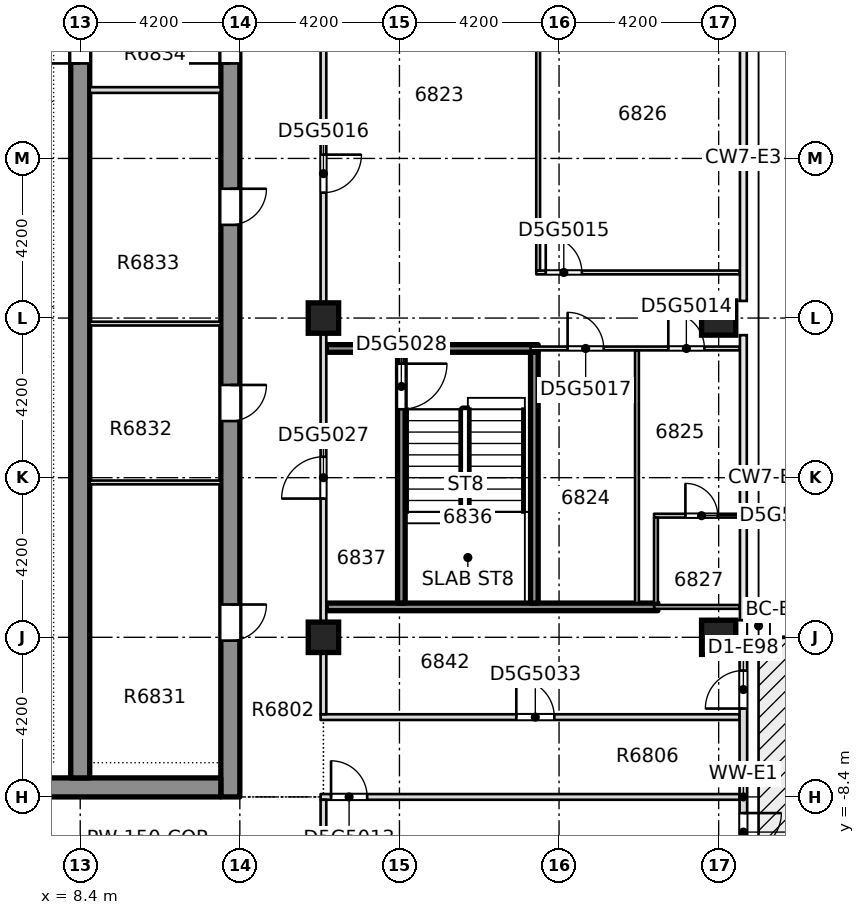
"""IFC4 building model, lengths in metres.
Left out: names, types, materials, properties, quantities, classifications, styles, units other than length and angle.
Written with IfcOpenShell. Run it as: python <this file> out.ifc"""

import sys

from ifc_helpers import new_model, si_unit, direction, frame, frame_2d, origin, origin_2d, place, context, subcontext, project, spatial, rectangle, extrude, element, fill, save


model = new_model("IFC4")
c1 = context("Model", 3, precision=1e-05, world=origin(), true_north=direction((0.0, 1.0)))
c2 = subcontext(c1, "Body", "Model", "MODEL_VIEW")
j1 = project(units=[si_unit("LENGTHUNIT", "METRE"), si_unit("PLANEANGLEUNIT", "RADIAN")], contexts=[c1])
p1 = place(None, origin())
s1 = spatial("IfcSite", under=j1, at=p1, CompositionType="ELEMENT")
p2 = place(p1, origin())
s2 = spatial("IfcBuilding", under=s1, at=p2, CompositionType="ELEMENT")
p3 = place(p2, frame((0.0, 0.0, 257.95)))
s3 = spatial("IfcBuildingStorey", under=s2, at=p3, CompositionType="ELEMENT", Elevation=257.95)
p4 = place(p3, frame((12.35, -8.4, -0.4), z_axis=(0.0, 0.0, 1.0), x_axis=(0.0, 1.0, 0.0)))
e1 = element("IfcWall", 1, at=p4, inside=s3, PredefinedType="SHEAR", context=c2, shape_type="SweptSolid", body=[
    extrude(rectangle(XDim=30.15, YDim=0.5, at=frame_2d((15.075, 0.0))), origin(), (0.0, 0.0, 1.0), 3.45),
])
p5 = place(p4, frame((4.113, 0.0, 0.4)))
e2 = element("IfcOpeningElement", 2, at=p5, cuts=e1, PredefinedType="OPENING", context=c2, shape_type="SweptSolid", body=[
    extrude(rectangle(XDim=0.95, YDim=2.1, at=frame_2d((0.475, 1.05))), frame((0.0, 0.26, 0.0), z_axis=(0.0, -1.0, 0.0), x_axis=(1.0, 0.0, 0.0)), (0.0, 0.0, 1.0), 0.52),
])
p6 = place(p4, frame((9.89, 0.0, 0.4)))
e3 = element("IfcOpeningElement", 3, at=p6, cuts=e1, PredefinedType="OPENING", context=c2, shape_type="SweptSolid", body=[
    extrude(rectangle(XDim=0.95, YDim=2.1, at=frame_2d((0.475, 1.05))), frame((0.0, 0.26, 0.0), z_axis=(0.0, -1.0, 0.0), x_axis=(1.0, 0.0, 0.0)), (0.0, 0.0, 1.0), 0.52),
])
p7 = place(p4, frame((15.052, 0.0, 0.4)))
e4 = element("IfcOpeningElement", 4, at=p7, cuts=e1, PredefinedType="OPENING", context=c2, shape_type="SweptSolid", body=[
    extrude(rectangle(XDim=0.95, YDim=2.1, at=frame_2d((0.475, 1.05))), frame((0.0, 0.26, 0.0), z_axis=(0.0, -1.0, 0.0), x_axis=(1.0, 0.0, 0.0)), (0.0, 0.0, 1.0), 0.52),
])
p8 = place(p4, frame((22.144, 0.0, 0.4)))
e5 = element("IfcOpeningElement", 5, at=p8, cuts=e1, PredefinedType="OPENING", context=c2, shape_type="SweptSolid", body=[
    extrude(rectangle(XDim=0.95, YDim=2.1, at=frame_2d((0.475, 1.05))), frame((0.0, 0.26, 0.0), z_axis=(0.0, -1.0, 0.0), x_axis=(1.0, 0.0, 0.0)), (0.0, 0.0, 1.0), 0.52),
])
p9 = place(p4, frame((24.998, 0.0, 0.4)))
e6 = element("IfcOpeningElement", 6, at=p9, cuts=e1, PredefinedType="OPENING", context=c2, shape_type="SweptSolid", body=[
    extrude(rectangle(XDim=0.95, YDim=2.1, at=frame_2d((0.475, 1.05))), frame((0.0, 0.26, 0.0), z_axis=(0.0, -1.0, 0.0), x_axis=(1.0, 0.0, 0.0)), (0.0, 0.0, 1.0), 0.52),
])
p10 = place(p4, frame((27.605, 0.0, 0.4)))
e7 = element("IfcOpeningElement", 7, at=p10, cuts=e1, PredefinedType="OPENING", context=c2, shape_type="SweptSolid", body=[
    extrude(rectangle(XDim=0.95, YDim=2.1, at=frame_2d((0.475, 1.05))), frame((0.0, 0.26, 0.0), z_axis=(0.0, -1.0, 0.0), x_axis=(1.0, 0.0, 0.0)), (0.0, 0.0, 1.0), 0.52),
])
p11 = place(p4, frame((19.3, 0.0, 0.4)))
e8 = element("IfcOpeningElement", 8, at=p11, cuts=e1, PredefinedType="OPENING", context=c2, shape_type="SweptSolid", body=[
    extrude(rectangle(XDim=1.2, YDim=2.1, at=frame_2d((0.6, 1.05))), frame((0.0, 0.26, 0.0), z_axis=(0.0, -1.0, 0.0), x_axis=(1.0, 0.0, 0.0)), (0.0, 0.0, 1.0), 0.52),
])
p12 = place(p3, frame((-12.1, -8.15, -0.4), z_axis=(0.0, 0.0, 1.0), x_axis=(1.0, 0.0, 0.0)))
e9 = element("IfcWall", 9, at=p12, inside=s3, PredefinedType="SHEAR", context=c2, shape_type="SweptSolid", body=[
    extrude(rectangle(XDim=24.2, YDim=0.5, at=frame_2d((12.1, 0.0))), origin(), (0.0, 0.0, 1.0), 3.45),
])
p13 = place(p12, frame((7.35, 0.0, 0.4)))
e10 = element("IfcOpeningElement", 10, at=p13, cuts=e9, PredefinedType="OPENING", context=c2, shape_type="SweptSolid", body=[
    extrude(rectangle(XDim=1.8, YDim=2.1, at=frame_2d((0.9, 1.05))), frame((0.0, 0.26, 0.0), z_axis=(0.0, -1.0, 0.0), x_axis=(1.0, 0.0, 0.0)), (0.0, 0.0, 1.0), 0.52),
])
p14 = place(p12, frame((15.05, 0.0, 0.4)))
e11 = element("IfcOpeningElement", 11, at=p14, cuts=e9, PredefinedType="OPENING", context=c2, shape_type="SweptSolid", body=[
    extrude(rectangle(XDim=1.8, YDim=2.1, at=frame_2d((0.9, 1.05))), frame((0.0, 0.26, 0.0), z_axis=(0.0, -1.0, 0.0), x_axis=(1.0, 0.0, 0.0)), (0.0, 0.0, 1.0), 0.52),
])
p15 = place(p3, frame((8.4, -7.9, -0.4), z_axis=(0.0, 0.0, 1.0), x_axis=(0.0, 1.0, 0.0)))
e12 = element("IfcWall", 12, at=p15, inside=s3, PredefinedType="SHEAR", context=c2, shape_type="SweptSolid", body=[
    extrude(rectangle(XDim=29.15, YDim=0.5, at=frame_2d((14.575, 0.0))), origin(), (0.0, 0.0, 1.0), 3.45),
])
p16 = place(p15, frame((18.8, 0.0, 0.4)))
e13 = element("IfcOpeningElement", 13, at=p16, cuts=e12, PredefinedType="OPENING", context=c2, shape_type="SweptSolid", body=[
    extrude(rectangle(XDim=1.2, YDim=2.1, at=frame_2d((0.6, 1.05))), frame((0.0, 0.26, 0.0), z_axis=(0.0, -1.0, 0.0), x_axis=(1.0, 0.0, 0.0)), (0.0, 0.0, 1.0), 0.52),
])
for number, where, z_axis, x_axis in (
    (14, (25.2, -4.2, -0.4), (0.0, 0.0, 1.0), (1.0, 0.0, 0.0)),
    (15, (25.2, 4.2, -0.4), (0.0, 0.0, 1.0), (1.0, 0.0, 0.0)),
):
    element("IfcColumn", number, at=place(p3, frame(where, z_axis=z_axis, x_axis=x_axis)), inside=s3, PredefinedType="COLUMN", context=c2, shape_type="SweptSolid", body=[
        extrude(rectangle(XDim=0.9, YDim=0.9, at=origin_2d()), origin(), (0.0, 0.0, 1.0), 3.45),
    ])
for number, where, z_axis, x_axis in (
    (16, (14.8, -4.2, -0.4), (0.0, 0.0, 1.0), (1.0, 0.0, 0.0)),
    (17, (14.8, 4.2, -0.4), (0.0, 0.0, 1.0), (1.0, 0.0, 0.0)),
):
    element("IfcColumn", number, at=place(p3, frame(where, z_axis=z_axis, x_axis=x_axis)), inside=s3, PredefinedType="COLUMN", context=c2, shape_type="SweptSolid", body=[
        extrude(rectangle(XDim=0.8, YDim=0.8, at=origin_2d()), origin(), (0.0, 0.0, 1.0), 3.45),
    ])
p17 = place(p3, frame((14.725, -8.4, 0.0), z_axis=(0.0, 0.0, 1.0), x_axis=(1.0, 0.0, 0.0)))
e18 = element("IfcWall", 18, at=p17, inside=s3, PredefinedType="PARTITIONING", context=c2, shape_type="SweptSolid", body=[
    extrude(rectangle(XDim=11.025, YDim=0.15, at=frame_2d((5.512, 0.0))), origin(), (0.0, 0.0, 1.0), 3.05),
])
p18 = place(p17, frame((0.275, 0.0, 0.0)))
e19 = element("IfcOpeningElement", 19, at=p18, cuts=e18, PredefinedType="OPENING", context=c2, shape_type="SweptSolid", body=[
    extrude(rectangle(XDim=0.95, YDim=2.1, at=frame_2d((0.475, 1.05))), frame((0.0, 0.085, 0.0), z_axis=(0.0, -1.0, 0.0), x_axis=(1.0, 0.0, 0.0)), (0.0, 0.0, 1.0), 0.17),
])
p19 = place(p3, frame((14.725, -6.3, 0.0), z_axis=(0.0, 0.0, 1.0), x_axis=(1.0, 0.0, 0.0)))
e20 = element("IfcWall", 20, at=p19, inside=s3, PredefinedType="PARTITIONING", context=c2, shape_type="SweptSolid", body=[
    extrude(rectangle(XDim=11.025, YDim=0.15, at=frame_2d((5.512, 0.0))), origin(), (0.0, 0.0, 1.0), 3.05),
])
p20 = place(p19, frame((5.15, 0.0, 0.0)))
e21 = element("IfcOpeningElement", 21, at=p20, cuts=e20, PredefinedType="OPENING", context=c2, shape_type="SweptSolid", body=[
    extrude(rectangle(XDim=1.0, YDim=2.1, at=frame_2d((0.5, 1.05))), frame((0.0, 0.085, 0.0), z_axis=(0.0, -1.0, 0.0), x_axis=(1.0, 0.0, 0.0)), (0.0, 0.0, 1.0), 0.17),
])
p21 = place(p3, frame((14.875, -3.4, 0.0), z_axis=(0.0, 0.0, 1.0), x_axis=(1.0, 0.0, 0.0)))
e22 = element("IfcWall", 22, at=p21, inside=s3, PredefinedType="SOLIDWALL", context=c2, shape_type="SweptSolid", body=[
    extrude(rectangle(XDim=8.725, YDim=0.2, at=frame_2d((4.363, 0.0))), origin(), (0.0, 0.0, 1.0), 3.05),
])
p22 = place(p3, frame((23.5, -3.4, 0.0), z_axis=(0.0, 0.0, 1.0), x_axis=(1.0, 0.0, 0.0)))
e23 = element("IfcWall", 23, at=p22, inside=s3, PredefinedType="PARTITIONING", context=c2, shape_type="SweptSolid", body=[
    extrude(rectangle(XDim=2.25, YDim=0.1, at=frame_2d((1.125, 0.0))), origin(), (0.0, 0.0, 1.0), 3.05),
])
p23 = place(p3, frame((23.5, -1.0, 0.0), z_axis=(0.0, 0.0, 1.0), x_axis=(1.0, 0.0, 0.0)))
e24 = element("IfcWall", 24, at=p23, inside=s3, PredefinedType="PARTITIONING", context=c2, shape_type="SweptSolid", body=[
    extrude(rectangle(XDim=2.25, YDim=0.1, at=frame_2d((1.125, 0.0))), origin(), (0.0, 0.0, 1.0), 3.05),
])
p24 = place(p23, frame((0.825, 0.0, 0.0)))
e25 = element("IfcOpeningElement", 25, at=p24, cuts=e24, PredefinedType="OPENING", context=c2, shape_type="SweptSolid", body=[
    extrude(rectangle(XDim=0.85, YDim=2.1, at=frame_2d((0.425, 1.05))), frame((0.0, 0.06, 0.0), z_axis=(0.0, -1.0, 0.0), x_axis=(1.0, 0.0, 0.0)), (0.0, 0.0, 1.0), 0.12),
])
p25 = place(p3, frame((14.875, 3.4, 0.0), z_axis=(0.0, 0.0, 1.0), x_axis=(1.0, 0.0, 0.0)))
e26 = element("IfcWall", 26, at=p25, inside=s3, PredefinedType="SOLIDWALL", context=c2, shape_type="SweptSolid", body=[
    extrude(rectangle(XDim=5.575, YDim=0.2, at=frame_2d((2.788, 0.0))), origin(), (0.0, 0.0, 1.0), 3.05),
])
p26 = place(p3, frame((20.25, 3.4, 0.0), z_axis=(0.0, 0.0, 1.0), x_axis=(1.0, 0.0, 0.0)))
e27 = element("IfcWall", 27, at=p26, inside=s3, PredefinedType="PARTITIONING", context=c2, shape_type="SweptSolid", body=[
    extrude(rectangle(XDim=5.5, YDim=0.1, at=frame_2d((2.75, 0.0))), origin(), (0.0, 0.0, 1.0), 3.05),
])
p27 = place(p26, frame((3.625, 0.0, 0.0)))
e28 = element("IfcOpeningElement", 28, at=p27, cuts=e27, PredefinedType="OPENING", context=c2, shape_type="SweptSolid", body=[
    extrude(rectangle(XDim=0.95, YDim=2.1, at=frame_2d((0.475, 1.05))), frame((0.0, 0.06, 0.0), z_axis=(0.0, -1.0, 0.0), x_axis=(1.0, 0.0, 0.0)), (0.0, 0.0, 1.0), 0.12),
])
p28 = place(p26, frame((0.975, 0.0, 0.0)))
e29 = element("IfcOpeningElement", 29, at=p28, cuts=e27, PredefinedType="OPENING", context=c2, shape_type="SweptSolid", body=[
    extrude(rectangle(XDim=0.95, YDim=2.1, at=frame_2d((0.475, 1.05))), frame((0.0, 0.06, 0.0), z_axis=(0.0, -1.0, 0.0), x_axis=(1.0, 0.0, 0.0)), (0.0, 0.0, 1.0), 0.12),
])
p29 = place(p3, frame((20.4, 5.4, 0.0), z_axis=(0.0, 0.0, 1.0), x_axis=(1.0, 0.0, 0.0)))
e30 = element("IfcWall", 30, at=p29, inside=s3, PredefinedType="PARTITIONING", context=c2, shape_type="SweptSolid", body=[
    extrude(rectangle(XDim=5.35, YDim=0.1, at=frame_2d((2.675, 0.0))), origin(), (0.0, 0.0, 1.0), 3.05),
])
p30 = place(p29, frame((0.25, 0.0, 0.0)))
e31 = element("IfcOpeningElement", 31, at=p30, cuts=e30, PredefinedType="OPENING", context=c2, shape_type="SweptSolid", body=[
    extrude(rectangle(XDim=0.95, YDim=2.1, at=frame_2d((0.475, 1.05))), frame((0.0, 0.06, 0.0), z_axis=(0.0, -1.0, 0.0), x_axis=(1.0, 0.0, 0.0)), (0.0, 0.0, 1.0), 0.12),
])
p31 = place(p3, frame((14.8, -10.525, 0.0), z_axis=(0.0, 0.0, 1.0), x_axis=(0.0, 1.0, 0.0)))
e32 = element("IfcWall", 32, at=p31, inside=s3, PredefinedType="PARTITIONING", context=c2, shape_type="SweptSolid", body=[
    extrude(rectangle(XDim=2.05, YDim=0.15, at=frame_2d((1.025, 0.0))), origin(), (0.0, 0.0, 1.0), 3.05),
])
p32 = place(p3, frame((14.8, -6.225, 0.0), z_axis=(0.0, 0.0, 1.0), x_axis=(0.0, 1.0, 0.0)))
e33 = element("IfcWall", 33, at=p32, inside=s3, PredefinedType="PARTITIONING", context=c2, shape_type="SweptSolid", body=[
    extrude(rectangle(XDim=18.75, YDim=0.15, at=frame_2d((9.375, 0.0))), origin(), (0.0, 0.0, 1.0), 3.05),
])
p33 = place(p32, frame((13.725, 0.0, 0.0)))
e34 = element("IfcOpeningElement", 34, at=p33, cuts=e33, PredefinedType="OPENING", context=c2, shape_type="SweptSolid", body=[
    extrude(rectangle(XDim=1.0, YDim=2.1, at=frame_2d((0.5, 1.05))), frame((0.0, 0.085, 0.0), z_axis=(0.0, -1.0, 0.0), x_axis=(1.0, 0.0, 0.0)), (0.0, 0.0, 1.0), 0.17),
])
p34 = place(p32, frame((5.675, 0.0, 0.0)))
e35 = element("IfcOpeningElement", 35, at=p34, cuts=e33, PredefinedType="OPENING", context=c2, shape_type="SweptSolid", body=[
    extrude(rectangle(XDim=1.1, YDim=2.1, at=frame_2d((0.55, 1.05))), frame((0.0, 0.085, 0.0), z_axis=(0.0, -1.0, 0.0), x_axis=(1.0, 0.0, 0.0)), (0.0, 0.0, 1.0), 0.17),
])
p35 = place(p3, frame((16.85, -3.3, 0.0), z_axis=(0.0, 0.0, 1.0), x_axis=(0.0, 1.0, 0.0)))
e36 = element("IfcWall", 36, at=p35, inside=s3, PredefinedType="SOLIDWALL", context=c2, shape_type="SweptSolid", body=[
    extrude(rectangle(XDim=6.6, YDim=0.2, at=frame_2d((3.3, 0.0))), origin(), (0.0, 0.0, 1.0), 3.05),
])
p36 = place(p35, frame((5.1, 0.0, 0.0)))
e37 = element("IfcOpeningElement", 37, at=p36, cuts=e36, PredefinedType="OPENING", context=c2, shape_type="SweptSolid", body=[
    extrude(rectangle(XDim=1.2, YDim=2.1, at=frame_2d((0.6, 1.05))), frame((0.0, 0.11, 0.0), z_axis=(0.0, -1.0, 0.0), x_axis=(1.0, 0.0, 0.0)), (0.0, 0.0, 1.0), 0.22),
])
p37 = place(p3, frame((20.35, -3.3, 0.0), z_axis=(0.0, 0.0, 1.0), x_axis=(0.0, 1.0, 0.0)))
e38 = element("IfcWall", 38, at=p37, inside=s3, PredefinedType="SOLIDWALL", context=c2, shape_type="SweptSolid", body=[
    extrude(rectangle(XDim=6.6, YDim=0.2, at=frame_2d((3.3, 0.0))), origin(), (0.0, 0.0, 1.0), 3.05),
])
p38 = place(p3, frame((20.45, 5.45, 0.0), z_axis=(0.0, 0.0, 1.0), x_axis=(0.0, 1.0, 0.0)))
e39 = element("IfcWall", 39, at=p38, inside=s3, PredefinedType="PARTITIONING", context=c2, shape_type="SweptSolid", body=[
    extrude(rectangle(XDim=7.075, YDim=0.1, at=frame_2d((3.538, 0.0))), origin(), (0.0, 0.0, 1.0), 3.05),
])
p39 = place(p3, frame((23.05, -3.3, 0.0), z_axis=(0.0, 0.0, 1.0), x_axis=(0.0, 1.0, 0.0)))
e40 = element("IfcWall", 40, at=p39, inside=s3, PredefinedType="PARTITIONING", context=c2, shape_type="SweptSolid", body=[
    extrude(rectangle(XDim=6.65, YDim=0.1, at=frame_2d((3.325, 0.0))), origin(), (0.0, 0.0, 1.0), 3.05),
])
p40 = place(p3, frame((23.55, -3.3, 0.0), z_axis=(0.0, 0.0, 1.0), x_axis=(0.0, 1.0, 0.0)))
e41 = element("IfcWall", 41, at=p40, inside=s3, PredefinedType="PARTITIONING", context=c2, shape_type="SweptSolid", body=[
    extrude(rectangle(XDim=2.25, YDim=0.1, at=frame_2d((1.125, 0.0))), origin(), (0.0, 0.0, 1.0), 3.05),
])
p41 = place(p3, frame((25.85, -12.15, 0.0), z_axis=(0.0, 0.0, 1.0), x_axis=(0.0, 1.0, 0.0)))
e42 = element("IfcWall", 42, at=p41, inside=s3, PredefinedType="STANDARD", context=c2, shape_type="SweptSolid", body=[
    extrude(rectangle(XDim=7.5, YDim=0.2, at=frame_2d((3.75, 0.0))), origin(), (0.0, 0.0, 1.0), 3.05),
])
p42 = place(p41, frame((0.425, 0.0, 0.2)))
e43 = element("IfcOpeningElement", 43, at=p42, cuts=e42, PredefinedType="OPENING", context=c2, shape_type="SweptSolid", body=[
    extrude(rectangle(XDim=1.8, YDim=2.65, at=frame_2d((0.9, 1.325))), frame((0.0, 0.11, 0.0), z_axis=(0.0, -1.0, 0.0), x_axis=(1.0, 0.0, 0.0)), (0.0, 0.0, 1.0), 0.22),
])
p43 = place(p41, frame((2.325, 0.0, 0.0)))
e44 = element("IfcOpeningElement", 44, at=p43, cuts=e42, PredefinedType="OPENING", context=c2, shape_type="SweptSolid", body=[
    extrude(rectangle(XDim=1.0, YDim=2.4, at=frame_2d((0.5, 1.2))), frame((0.0, 0.11, 0.0), z_axis=(0.0, -1.0, 0.0), x_axis=(1.0, 0.0, 0.0)), (0.0, 0.0, 1.0), 0.22),
])
p44 = place(p41, frame((6.075, 0.0, 0.0)))
e45 = element("IfcOpeningElement", 45, at=p44, cuts=e42, PredefinedType="OPENING", context=c2, shape_type="SweptSolid", body=[
    extrude(rectangle(XDim=1.0, YDim=2.4, at=frame_2d((0.5, 1.2))), frame((0.0, 0.11, 0.0), z_axis=(0.0, -1.0, 0.0), x_axis=(1.0, 0.0, 0.0)), (0.0, 0.0, 1.0), 0.22),
])
for number, where, z_axis, x_axis in (
    (46, (8.651, -0.125, 0.0), (0.0, 0.0, 1.0), (1.0, 0.0, 0.0)),
    (47, (8.651, 4.054, 0.0), (0.0, 0.0, 1.0), (1.0, 0.0, 0.0)),
):
    element("IfcWall", number, at=place(p3, frame(where, z_axis=z_axis, x_axis=x_axis)), inside=s3, PredefinedType="PARTITIONING", context=c2, shape_type="SweptSolid", body=[
        extrude(rectangle(XDim=3.448, YDim=0.1, at=frame_2d((1.724, 0.0))), origin(), (0.0, 0.0, 1.0), 3.05),
    ])
p45 = place(p3, frame((8.651, 10.2, 0.0), z_axis=(0.0, 0.0, 1.0), x_axis=(1.0, 0.0, 0.0)))
e48 = element("IfcWall", 48, at=p45, inside=s3, PredefinedType="PARTITIONING", context=c2, shape_type="SweptSolid", body=[
    extrude(rectangle(XDim=3.448, YDim=0.15, at=frame_2d((1.724, 0.0))), origin(), (0.0, 0.0, 1.0), 3.05),
])
p46 = place(p18, origin())
e49 = element("IfcDoor", 49, at=p46, inside=s3, OperationType="SINGLE_SWING_RIGHT", PredefinedType="DOOR", context=c2, shape_type="SweptSolid", body=[
    extrude(rectangle(XDim=0.95, YDim=2.1, at=frame_2d((0.475, 1.05))), frame((0.0, 0.025, 0.0), z_axis=(0.0, -1.0, 0.0), x_axis=(1.0, 0.0, 0.0)), (0.0, 0.0, 1.0), 0.05),
])
fill(e19, e49)
p47 = place(p27, origin())
e50 = element("IfcDoor", 50, at=p47, inside=s3, OperationType="SINGLE_SWING_LEFT", PredefinedType="DOOR", context=c2, shape_type="SweptSolid", body=[
    extrude(rectangle(XDim=0.95, YDim=2.1, at=frame_2d((0.475, 1.05))), frame((0.0, 0.025, 0.0), z_axis=(0.0, -1.0, 0.0), x_axis=(1.0, 0.0, 0.0)), (0.0, 0.0, 1.0), 0.05),
])
fill(e28, e50)
p48 = place(p30, origin())
e51 = element("IfcDoor", 51, at=p48, inside=s3, OperationType="SINGLE_SWING_LEFT", PredefinedType="DOOR", context=c2, shape_type="SweptSolid", body=[
    extrude(rectangle(XDim=0.95, YDim=2.1, at=frame_2d((0.475, 1.05))), frame((0.0, 0.025, 0.0), z_axis=(0.0, -1.0, 0.0), x_axis=(1.0, 0.0, 0.0)), (0.0, 0.0, 1.0), 0.05),
])
fill(e31, e51)
p49 = place(p33, origin())
e52 = element("IfcDoor", 52, at=p49, inside=s3, OperationType="SINGLE_SWING_RIGHT", PredefinedType="DOOR", context=c2, shape_type="SweptSolid", body=[
    extrude(rectangle(XDim=1.0, YDim=2.1, at=frame_2d((0.5, 1.05))), frame((0.0, 0.025, 0.0), z_axis=(0.0, -1.0, 0.0), x_axis=(1.0, 0.0, 0.0)), (0.0, 0.0, 1.0), 0.05),
])
fill(e34, e52)
p50 = place(p28, origin())
e53 = element("IfcDoor", 53, at=p50, inside=s3, OperationType="SINGLE_SWING_RIGHT", PredefinedType="DOOR", context=c2, shape_type="SweptSolid", body=[
    extrude(rectangle(XDim=0.95, YDim=2.1, at=frame_2d((0.475, 1.05))), frame((0.0, 0.025, 0.0), z_axis=(0.0, -1.0, 0.0), x_axis=(1.0, 0.0, 0.0)), (0.0, 0.0, 1.0), 0.05),
])
fill(e29, e53)
p51 = place(p24, origin())
e54 = element("IfcDoor", 54, at=p51, inside=s3, OperationType="SINGLE_SWING_RIGHT", PredefinedType="DOOR", context=c2, shape_type="SweptSolid", body=[
    extrude(rectangle(XDim=0.85, YDim=2.1, at=frame_2d((0.425, 1.05))), frame((0.0, 0.025, 0.0), z_axis=(0.0, -1.0, 0.0), x_axis=(1.0, 0.0, 0.0)), (0.0, 0.0, 1.0), 0.05),
])
fill(e25, e54)
p52 = place(p34, origin())
e55 = element("IfcDoor", 55, at=p52, inside=s3, OperationType="SINGLE_SWING_LEFT", PredefinedType="DOOR", context=c2, shape_type="SweptSolid", body=[
    extrude(rectangle(XDim=1.1, YDim=2.1, at=frame_2d((0.55, 1.05))), frame((0.0, 0.025, 0.0), z_axis=(0.0, -1.0, 0.0), x_axis=(1.0, 0.0, 0.0)), (0.0, 0.0, 1.0), 0.05),
])
fill(e35, e55)
p53 = place(p36, origin())
e56 = element("IfcDoor", 56, at=p53, inside=s3, OperationType="SINGLE_SWING_LEFT", PredefinedType="DOOR", context=c2, shape_type="SweptSolid", body=[
    extrude(rectangle(XDim=1.2, YDim=2.1, at=frame_2d((0.6, 1.05))), frame((0.0, 0.025, 0.0), z_axis=(0.0, -1.0, 0.0), x_axis=(1.0, 0.0, 0.0)), (0.0, 0.0, 1.0), 0.05),
])
fill(e37, e56)
p54 = place(p20, origin())
e57 = element("IfcDoor", 57, at=p54, inside=s3, OperationType="SINGLE_SWING_RIGHT", PredefinedType="DOOR", context=c2, shape_type="SweptSolid", body=[
    extrude(rectangle(XDim=1.0, YDim=2.1, at=frame_2d((0.5, 1.05))), frame((0.0, 0.025, 0.0), z_axis=(0.0, -1.0, 0.0), x_axis=(1.0, 0.0, 0.0)), (0.0, 0.0, 1.0), 0.05),
])
fill(e21, e57)
p55 = place(p43, origin())
e58 = element("IfcDoor", 58, at=p55, inside=s3, OperationType="SINGLE_SWING_LEFT", PredefinedType="DOOR", context=c2, shape_type="SweptSolid", body=[
    extrude(rectangle(XDim=1.0, YDim=2.4, at=frame_2d((0.5, 1.2))), frame((0.0, 0.025, 0.0), z_axis=(0.0, -1.0, 0.0), x_axis=(1.0, 0.0, 0.0)), (0.0, 0.0, 1.0), 0.05),
])
fill(e44, e58)
p56 = place(p44, origin())
e59 = element("IfcDoor", 59, at=p56, inside=s3, OperationType="SINGLE_SWING_LEFT", PredefinedType="DOOR", context=c2, shape_type="SweptSolid", body=[
    extrude(rectangle(XDim=1.0, YDim=2.4, at=frame_2d((0.5, 1.2))), frame((0.0, 0.025, 0.0), z_axis=(0.0, -1.0, 0.0), x_axis=(1.0, 0.0, 0.0)), (0.0, 0.0, 1.0), 0.05),
])
fill(e45, e59)
p57 = place(p5, origin())
e60 = element("IfcDoor", 60, at=p57, inside=s3, OperationType="SINGLE_SWING_LEFT", PredefinedType="DOOR", context=c2, shape_type="SweptSolid", body=[
    extrude(rectangle(XDim=0.95, YDim=2.1, at=frame_2d((0.475, 1.05))), frame((0.0, 0.025, 0.0), z_axis=(0.0, -1.0, 0.0), x_axis=(1.0, 0.0, 0.0)), (0.0, 0.0, 1.0), 0.05),
])
fill(e2, e60)
p58 = place(p6, origin())
e61 = element("IfcDoor", 61, at=p58, inside=s3, OperationType="SINGLE_SWING_LEFT", PredefinedType="DOOR", context=c2, shape_type="SweptSolid", body=[
    extrude(rectangle(XDim=0.95, YDim=2.1, at=frame_2d((0.475, 1.05))), frame((0.0, 0.025, 0.0), z_axis=(0.0, -1.0, 0.0), x_axis=(1.0, 0.0, 0.0)), (0.0, 0.0, 1.0), 0.05),
])
fill(e3, e61)
p59 = place(p7, origin())
e62 = element("IfcDoor", 62, at=p59, inside=s3, OperationType="SINGLE_SWING_LEFT", PredefinedType="DOOR", context=c2, shape_type="SweptSolid", body=[
    extrude(rectangle(XDim=0.95, YDim=2.1, at=frame_2d((0.475, 1.05))), frame((0.0, 0.025, 0.0), z_axis=(0.0, -1.0, 0.0), x_axis=(1.0, 0.0, 0.0)), (0.0, 0.0, 1.0), 0.05),
])
fill(e4, e62)
p60 = place(p11, origin())
e63 = element("IfcDoor", 63, at=p60, inside=s3, OperationType="SINGLE_SWING_LEFT", PredefinedType="DOOR", context=c2, shape_type="SweptSolid", body=[
    extrude(rectangle(XDim=1.2, YDim=2.1, at=frame_2d((0.6, 1.05))), frame((0.0, 0.025, 0.0), z_axis=(0.0, -1.0, 0.0), x_axis=(1.0, 0.0, 0.0)), (0.0, 0.0, 1.0), 0.05),
])
fill(e8, e63)
p61 = place(p16, origin())
e64 = element("IfcDoor", 64, at=p61, inside=s3, OperationType="SINGLE_SWING_LEFT", PredefinedType="DOOR", context=c2, shape_type="SweptSolid", body=[
    extrude(rectangle(XDim=1.2, YDim=2.1, at=frame_2d((0.6, 1.05))), frame((0.0, 0.025, 0.0), z_axis=(0.0, -1.0, 0.0), x_axis=(1.0, 0.0, 0.0)), (0.0, 0.0, 1.0), 0.05),
])
fill(e13, e64)
save(model, sys.argv[1])
